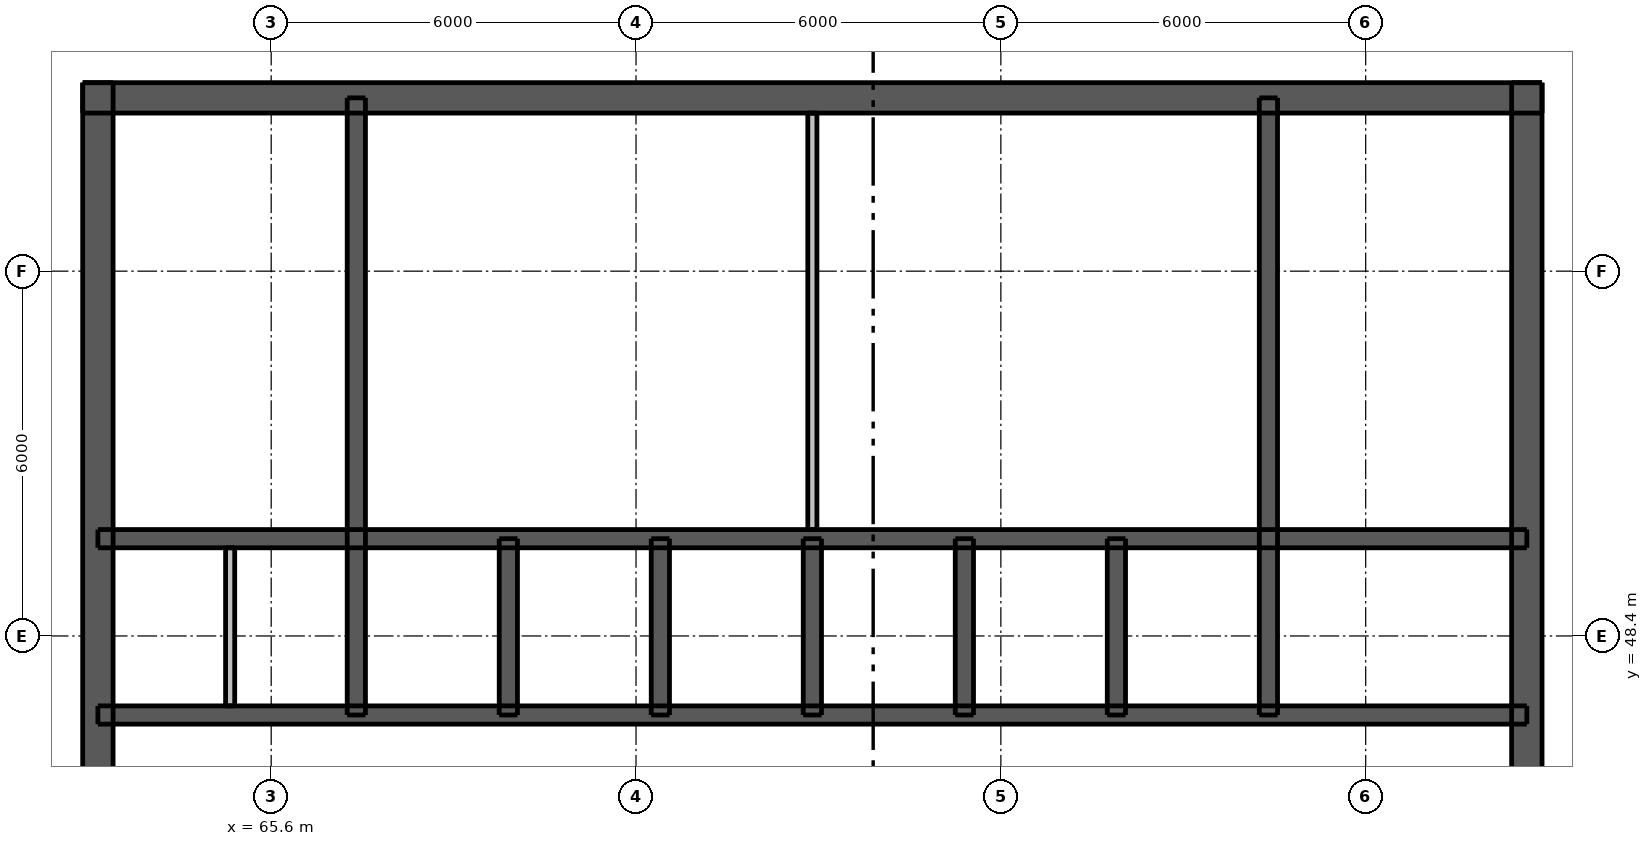
"""IFC4 building model, lengths in metres.
Left out: names, types, materials, properties, quantities, classifications, styles, units other than length and angle.
Written with IfcOpenShell. Run it as: python <this file> out.ifc"""

import sys

from ifc_helpers import new_model, si_unit, direction, frame, frame_2d, origin, place, context, subcontext, project, spatial, rectangle, extrude, element, fill, save


model = new_model("IFC4")
c1 = context("Model", 3, precision=1e-05, world=origin(), true_north=direction((0.0, 1.0)))
c2 = subcontext(c1, "Body", "Model", "MODEL_VIEW")
j1 = project(units=[si_unit("LENGTHUNIT", "METRE"), si_unit("PLANEANGLEUNIT", "RADIAN")], contexts=[c1])
p1 = place(None, origin())
s1 = spatial("IfcSite", under=j1, at=p1, CompositionType="ELEMENT")
p2 = place(p1, origin())
s2 = spatial("IfcBuilding", under=s1, at=p2, CompositionType="ELEMENT")
p3 = place(p2, frame((0.0, 0.0, 242.2)))
s3 = spatial("IfcBuildingStorey", under=s2, at=p3, CompositionType="ELEMENT", Elevation=242.2)
p4 = place(p3, frame((62.5, 57.25, 0.0), z_axis=(0.0, 0.0, 1.0), x_axis=(1.0, 0.0, 0.0)))
e1 = element("IfcWall", 1, at=p4, inside=s3, PredefinedType="SHEAR", context=c2, shape_type="SweptSolid", body=[
    extrude(rectangle(XDim=24.0, YDim=0.5, at=frame_2d((12.0, 0.0))), origin(), (0.0, 0.0, 1.0), 3.05),
])
p5 = place(p4, frame((21.025, 0.0, 0.0)))
e2 = element("IfcOpeningElement", 2, at=p5, cuts=e1, PredefinedType="OPENING", context=c2, shape_type="SweptSolid", body=[
    extrude(rectangle(XDim=1.1, YDim=2.1, at=frame_2d((0.55, 1.05))), frame((0.0, 0.26, 0.0), z_axis=(0.0, -1.0, 0.0), x_axis=(1.0, 0.0, 0.0)), (0.0, 0.0, 1.0), 0.52),
])
p6 = place(p4, frame((1.875, 0.0, 0.0)))
e3 = element("IfcOpeningElement", 3, at=p6, cuts=e1, PredefinedType="OPENING", context=c2, shape_type="SweptSolid", body=[
    extrude(rectangle(XDim=1.1, YDim=2.1, at=frame_2d((0.55, 1.05))), frame((0.0, 0.26, 0.0), z_axis=(0.0, -1.0, 0.0), x_axis=(1.0, 0.0, 0.0)), (0.0, 0.0, 1.0), 0.52),
])
p7 = place(p4, frame((7.875, 0.0, 0.0)))
e4 = element("IfcOpeningElement", 4, at=p7, cuts=e1, PredefinedType="OPENING", context=c2, shape_type="SweptSolid", body=[
    extrude(rectangle(XDim=0.9, YDim=2.1, at=frame_2d((0.45, 1.05))), frame((0.0, 0.26, 0.0), z_axis=(0.0, -1.0, 0.0), x_axis=(1.0, 0.0, 0.0)), (0.0, 0.0, 1.0), 0.52),
])
p8 = place(p4, frame((15.225, 0.0, 0.0)))
e5 = element("IfcOpeningElement", 5, at=p8, cuts=e1, PredefinedType="OPENING", context=c2, shape_type="SweptSolid", body=[
    extrude(rectangle(XDim=0.9, YDim=2.1, at=frame_2d((0.45, 1.05))), frame((0.0, 0.26, 0.0), z_axis=(0.0, -1.0, 0.0), x_axis=(1.0, 0.0, 0.0)), (0.0, 0.0, 1.0), 0.52),
])
p9 = place(p3, frame((62.75, 33.5, 0.0), z_axis=(0.0, 0.0, 1.0), x_axis=(0.0, 1.0, 0.0)))
e6 = element("IfcWall", 6, at=p9, inside=s3, PredefinedType="SHEAR", context=c2, shape_type="SweptSolid", body=[
    extrude(rectangle(XDim=24.0, YDim=0.5, at=frame_2d((12.0, 0.0))), origin(), (0.0, 0.0, 1.0), 3.05),
])
p10 = place(p9, frame((11.2, 0.0, 0.0)))
e7 = element("IfcOpeningElement", 7, at=p10, cuts=e6, PredefinedType="OPENING", context=c2, shape_type="SweptSolid", body=[
    extrude(rectangle(XDim=1.6, YDim=2.1, at=frame_2d((0.8, 1.05))), frame((0.0, 0.26, 0.0), z_axis=(0.0, -1.0, 0.0), x_axis=(1.0, 0.0, 0.0)), (0.0, 0.0, 1.0), 0.52),
])
p11 = place(p3, frame((86.25, 33.5, 0.0), z_axis=(0.0, 0.0, 1.0), x_axis=(0.0, 1.0, 0.0)))
e8 = element("IfcWall", 8, at=p11, inside=s3, PredefinedType="SHEAR", context=c2, shape_type="SweptSolid", body=[
    extrude(rectangle(XDim=24.0, YDim=0.5, at=frame_2d((12.0, 0.0))), origin(), (0.0, 0.0, 1.0), 3.05),
])
p12 = place(p11, frame((11.2, 0.0, 0.0)))
e9 = element("IfcOpeningElement", 9, at=p12, cuts=e8, PredefinedType="OPENING", context=c2, shape_type="SweptSolid", body=[
    extrude(rectangle(XDim=1.6, YDim=2.1, at=frame_2d((0.8, 1.05))), frame((0.0, 0.26, 0.0), z_axis=(0.0, -1.0, 0.0), x_axis=(1.0, 0.0, 0.0)), (0.0, 0.0, 1.0), 0.52),
])
p13 = place(p3, frame((62.75, 47.1, 0.0), z_axis=(0.0, 0.0, 1.0), x_axis=(1.0, 0.0, 0.0)))
e10 = element("IfcWall", 10, at=p13, inside=s3, PredefinedType="SHEAR", context=c2, shape_type="SweptSolid", body=[
    extrude(rectangle(XDim=23.5, YDim=0.3, at=frame_2d((11.75, 0.0))), origin(), (0.0, 0.0, 1.0), 3.05),
])
p14 = place(p13, frame((0.762, 0.0, 0.0)))
e11 = element("IfcOpeningElement", 11, at=p14, cuts=e10, PredefinedType="OPENING", context=c2, shape_type="SweptSolid", body=[
    extrude(rectangle(XDim=0.9, YDim=2.1, at=frame_2d((0.45, 1.05))), frame((0.0, 0.16, 0.0), z_axis=(0.0, -1.0, 0.0), x_axis=(1.0, 0.0, 0.0)), (0.0, 0.0, 1.0), 0.32),
])
p15 = place(p13, frame((2.688, 0.0, 0.0)))
e12 = element("IfcOpeningElement", 12, at=p15, cuts=e10, PredefinedType="OPENING", context=c2, shape_type="SweptSolid", body=[
    extrude(rectangle(XDim=0.9, YDim=2.1, at=frame_2d((0.45, 1.05))), frame((0.0, 0.16, 0.0), z_axis=(0.0, -1.0, 0.0), x_axis=(1.0, 0.0, 0.0)), (0.0, 0.0, 1.0), 0.32),
])
p16 = place(p13, frame((20.875, 0.0, 0.0)))
e13 = element("IfcOpeningElement", 13, at=p16, cuts=e10, PredefinedType="OPENING", context=c2, shape_type="SweptSolid", body=[
    extrude(rectangle(XDim=0.9, YDim=2.1, at=frame_2d((0.45, 1.05))), frame((0.0, 0.16, 0.0), z_axis=(0.0, -1.0, 0.0), x_axis=(1.0, 0.0, 0.0)), (0.0, 0.0, 1.0), 0.32),
])
p17 = place(p13, frame((4.95, 0.0, 0.0)))
e14 = element("IfcOpeningElement", 14, at=p17, cuts=e10, PredefinedType="OPENING", context=c2, shape_type="SweptSolid", body=[
    extrude(rectangle(XDim=1.1, YDim=2.1, at=frame_2d((0.55, 1.05))), frame((0.0, 0.16, 0.0), z_axis=(0.0, -1.0, 0.0), x_axis=(1.0, 0.0, 0.0)), (0.0, 0.0, 1.0), 0.32),
])
p18 = place(p13, frame((7.45, 0.0, 0.0)))
e15 = element("IfcOpeningElement", 15, at=p18, cuts=e10, PredefinedType="OPENING", context=c2, shape_type="SweptSolid", body=[
    extrude(rectangle(XDim=1.1, YDim=2.1, at=frame_2d((0.55, 1.05))), frame((0.0, 0.16, 0.0), z_axis=(0.0, -1.0, 0.0), x_axis=(1.0, 0.0, 0.0)), (0.0, 0.0, 1.0), 0.32),
])
p19 = place(p13, frame((9.95, 0.0, 0.0)))
e16 = element("IfcOpeningElement", 16, at=p19, cuts=e10, PredefinedType="OPENING", context=c2, shape_type="SweptSolid", body=[
    extrude(rectangle(XDim=1.1, YDim=2.1, at=frame_2d((0.55, 1.05))), frame((0.0, 0.16, 0.0), z_axis=(0.0, -1.0, 0.0), x_axis=(1.0, 0.0, 0.0)), (0.0, 0.0, 1.0), 0.32),
])
p20 = place(p13, frame((12.45, 0.0, 0.0)))
e17 = element("IfcOpeningElement", 17, at=p20, cuts=e10, PredefinedType="OPENING", context=c2, shape_type="SweptSolid", body=[
    extrude(rectangle(XDim=1.1, YDim=2.1, at=frame_2d((0.55, 1.05))), frame((0.0, 0.16, 0.0), z_axis=(0.0, -1.0, 0.0), x_axis=(1.0, 0.0, 0.0)), (0.0, 0.0, 1.0), 0.32),
])
p21 = place(p13, frame((14.95, 0.0, 0.0)))
e18 = element("IfcOpeningElement", 18, at=p21, cuts=e10, PredefinedType="OPENING", context=c2, shape_type="SweptSolid", body=[
    extrude(rectangle(XDim=1.1, YDim=2.1, at=frame_2d((0.55, 1.05))), frame((0.0, 0.16, 0.0), z_axis=(0.0, -1.0, 0.0), x_axis=(1.0, 0.0, 0.0)), (0.0, 0.0, 1.0), 0.32),
])
p22 = place(p13, frame((17.45, 0.0, 0.0)))
e19 = element("IfcOpeningElement", 19, at=p22, cuts=e10, PredefinedType="OPENING", context=c2, shape_type="SweptSolid", body=[
    extrude(rectangle(XDim=1.1, YDim=2.1, at=frame_2d((0.55, 1.05))), frame((0.0, 0.16, 0.0), z_axis=(0.0, -1.0, 0.0), x_axis=(1.0, 0.0, 0.0)), (0.0, 0.0, 1.0), 0.32),
])
p23 = place(p3, frame((62.75, 50.0, 0.0), z_axis=(0.0, 0.0, 1.0), x_axis=(1.0, 0.0, 0.0)))
e20 = element("IfcWall", 20, at=p23, inside=s3, PredefinedType="SHEAR", context=c2, shape_type="SweptSolid", body=[
    extrude(rectangle(XDim=23.5, YDim=0.3, at=frame_2d((11.75, 0.0))), origin(), (0.0, 0.0, 1.0), 3.05),
])
for number, where, z_axis, x_axis in (
    (21, (67.0, 47.1, 0.0), (0.0, 0.0, 1.0), (0.0, 1.0, 0.0)),
    (22, (82.0, 47.1, 0.0), (0.0, 0.0, 1.0), (0.0, 1.0, 0.0)),
):
    element("IfcWall", number, at=place(p3, frame(where, z_axis=z_axis, x_axis=x_axis)), inside=s3, PredefinedType="SHEAR", context=c2, shape_type="SweptSolid", body=[
        extrude(rectangle(XDim=10.15, YDim=0.3, at=frame_2d((5.075, 0.0))), origin(), (0.0, 0.0, 1.0), 3.05),
    ])
for number, where, z_axis, x_axis in (
    (23, (69.5, 47.1, 0.0), (0.0, 0.0, 1.0), (0.0, 1.0, 0.0)),
    (24, (72.0, 47.1, 0.0), (0.0, 0.0, 1.0), (0.0, 1.0, 0.0)),
    (25, (74.5, 47.1, 0.0), (0.0, 0.0, 1.0), (0.0, 1.0, 0.0)),
    (26, (77.0, 47.1, 0.0), (0.0, 0.0, 1.0), (0.0, 1.0, 0.0)),
    (27, (79.5, 47.1, 0.0), (0.0, 0.0, 1.0), (0.0, 1.0, 0.0)),
):
    element("IfcWall", number, at=place(p3, frame(where, z_axis=z_axis, x_axis=x_axis)), inside=s3, PredefinedType="SHEAR", context=c2, shape_type="SweptSolid", body=[
        extrude(rectangle(XDim=2.9, YDim=0.3, at=frame_2d((1.45, 0.0))), origin(), (0.0, 0.0, 1.0), 3.05),
    ])
p24 = place(p3, frame((64.925, 47.25, 0.0), z_axis=(0.0, 0.0, 1.0), x_axis=(0.0, 1.0, 0.0)))
e28 = element("IfcWall", 28, at=p24, inside=s3, PredefinedType="PLUMBINGWALL", context=c2, shape_type="SweptSolid", body=[
    extrude(rectangle(XDim=2.6, YDim=0.15, at=frame_2d((1.3, 0.0))), origin(), (0.0, 0.0, 1.0), 3.05),
])
p25 = place(p3, frame((74.5, 50.15, 0.0), z_axis=(0.0, 0.0, 1.0), x_axis=(0.0, 1.0, 0.0)))
e29 = element("IfcWall", 29, at=p25, inside=s3, PredefinedType="PLUMBINGWALL", context=c2, shape_type="SweptSolid", body=[
    extrude(rectangle(XDim=6.85, YDim=0.15, at=frame_2d((3.425, 0.0))), origin(), (0.0, 0.0, 1.0), 3.05),
])
p26 = place(p5, origin())
e30 = element("IfcDoor", 30, at=p26, inside=s3, OperationType="SINGLE_SWING_RIGHT", PredefinedType="DOOR", context=c2, shape_type="SweptSolid", body=[
    extrude(rectangle(XDim=1.1, YDim=2.1, at=frame_2d((0.55, 1.05))), frame((0.0, -0.188, 0.0), z_axis=(0.0, -1.0, 0.0), x_axis=(1.0, 0.0, 0.0)), (0.0, 0.0, 1.0), 0.05),
])
fill(e2, e30)
p27 = place(p6, origin())
e31 = element("IfcDoor", 31, at=p27, inside=s3, OperationType="SINGLE_SWING_LEFT", PredefinedType="DOOR", context=c2, shape_type="SweptSolid", body=[
    extrude(rectangle(XDim=1.1, YDim=2.1, at=frame_2d((0.55, 1.05))), frame((0.0, -0.188, 0.0), z_axis=(0.0, -1.0, 0.0), x_axis=(1.0, 0.0, 0.0)), (0.0, 0.0, 1.0), 0.05),
])
fill(e3, e31)
p28 = place(p10, origin())
e32 = element("IfcDoor", 32, at=p28, inside=s3, OperationType="DOUBLE_DOOR_SINGLE_SWING", PredefinedType="DOOR", context=c2, shape_type="SweptSolid", body=[
    extrude(rectangle(XDim=1.6, YDim=2.1, at=frame_2d((0.8, 1.05))), frame((0.0, -0.188, 0.0), z_axis=(0.0, -1.0, 0.0), x_axis=(1.0, 0.0, 0.0)), (0.0, 0.0, 1.0), 0.05),
])
fill(e7, e32)
p29 = place(p12, origin())
e33 = element("IfcDoor", 33, at=p29, inside=s3, OperationType="DOUBLE_DOOR_SINGLE_SWING", PredefinedType="DOOR", context=c2, shape_type="SweptSolid", body=[
    extrude(rectangle(XDim=1.6, YDim=2.1, at=frame_2d((0.8, 1.05))), frame((0.0, 0.237, 0.0), z_axis=(0.0, -1.0, 0.0), x_axis=(1.0, 0.0, 0.0)), (0.0, 0.0, 1.0), 0.05),
])
fill(e9, e33)
p30 = place(p14, origin())
e34 = element("IfcDoor", 34, at=p30, inside=s3, OperationType="SINGLE_SWING_LEFT", PredefinedType="DOOR", context=c2, shape_type="SweptSolid", body=[
    extrude(rectangle(XDim=0.9, YDim=2.1, at=frame_2d((0.45, 1.05))), frame((0.0, 0.138, 0.0), z_axis=(0.0, -1.0, 0.0), x_axis=(1.0, 0.0, 0.0)), (0.0, 0.0, 1.0), 0.05),
])
fill(e11, e34)
p31 = place(p15, origin())
e35 = element("IfcDoor", 35, at=p31, inside=s3, OperationType="SINGLE_SWING_RIGHT", PredefinedType="DOOR", context=c2, shape_type="SweptSolid", body=[
    extrude(rectangle(XDim=0.9, YDim=2.1, at=frame_2d((0.45, 1.05))), frame((0.0, 0.138, 0.0), z_axis=(0.0, -1.0, 0.0), x_axis=(1.0, 0.0, 0.0)), (0.0, 0.0, 1.0), 0.05),
])
fill(e12, e35)
p32 = place(p16, origin())
e36 = element("IfcDoor", 36, at=p32, inside=s3, OperationType="SINGLE_SWING_LEFT", PredefinedType="DOOR", context=c2, shape_type="SweptSolid", body=[
    extrude(rectangle(XDim=0.9, YDim=2.1, at=frame_2d((0.45, 1.05))), frame((0.0, 0.138, 0.0), z_axis=(0.0, -1.0, 0.0), x_axis=(1.0, 0.0, 0.0)), (0.0, 0.0, 1.0), 0.05),
])
fill(e13, e36)
p33 = place(p7, origin())
e37 = element("IfcDoor", 37, at=p33, inside=s3, OperationType="SINGLE_SWING_RIGHT", PredefinedType="DOOR", context=c2, shape_type="SweptSolid", body=[
    extrude(rectangle(XDim=0.9, YDim=2.1, at=frame_2d((0.45, 1.05))), frame((0.0, -0.188, 0.0), z_axis=(0.0, -1.0, 0.0), x_axis=(1.0, 0.0, 0.0)), (0.0, 0.0, 1.0), 0.05),
])
fill(e4, e37)
p34 = place(p8, origin())
e38 = element("IfcDoor", 38, at=p34, inside=s3, OperationType="SINGLE_SWING_RIGHT", PredefinedType="DOOR", context=c2, shape_type="SweptSolid", body=[
    extrude(rectangle(XDim=0.9, YDim=2.1, at=frame_2d((0.45, 1.05))), frame((0.0, -0.188, 0.0), z_axis=(0.0, -1.0, 0.0), x_axis=(1.0, 0.0, 0.0)), (0.0, 0.0, 1.0), 0.05),
])
fill(e5, e38)
p35 = place(p17, origin())
e39 = element("IfcDoor", 39, at=p35, inside=s3, OperationType="DOUBLE_DOOR_SLIDING", PredefinedType="DOOR", context=c2, shape_type="SweptSolid", body=[
    extrude(rectangle(XDim=1.1, YDim=2.1, at=frame_2d((0.55, 1.05))), frame((0.0, 0.025, 0.0), z_axis=(0.0, -1.0, 0.0), x_axis=(1.0, 0.0, 0.0)), (0.0, 0.0, 1.0), 0.05),
])
fill(e14, e39)
p36 = place(p18, origin())
e40 = element("IfcDoor", 40, at=p36, inside=s3, OperationType="DOUBLE_DOOR_SLIDING", PredefinedType="DOOR", context=c2, shape_type="SweptSolid", body=[
    extrude(rectangle(XDim=1.1, YDim=2.1, at=frame_2d((0.55, 1.05))), frame((0.0, 0.025, 0.0), z_axis=(0.0, -1.0, 0.0), x_axis=(1.0, 0.0, 0.0)), (0.0, 0.0, 1.0), 0.05),
])
fill(e15, e40)
p37 = place(p19, origin())
e41 = element("IfcDoor", 41, at=p37, inside=s3, OperationType="DOUBLE_DOOR_SLIDING", PredefinedType="DOOR", context=c2, shape_type="SweptSolid", body=[
    extrude(rectangle(XDim=1.1, YDim=2.1, at=frame_2d((0.55, 1.05))), frame((0.0, 0.025, 0.0), z_axis=(0.0, -1.0, 0.0), x_axis=(1.0, 0.0, 0.0)), (0.0, 0.0, 1.0), 0.05),
])
fill(e16, e41)
p38 = place(p20, origin())
e42 = element("IfcDoor", 42, at=p38, inside=s3, OperationType="DOUBLE_DOOR_SLIDING", PredefinedType="DOOR", context=c2, shape_type="SweptSolid", body=[
    extrude(rectangle(XDim=1.1, YDim=2.1, at=frame_2d((0.55, 1.05))), frame((0.0, 0.025, 0.0), z_axis=(0.0, -1.0, 0.0), x_axis=(1.0, 0.0, 0.0)), (0.0, 0.0, 1.0), 0.05),
])
fill(e17, e42)
p39 = place(p21, origin())
e43 = element("IfcDoor", 43, at=p39, inside=s3, OperationType="DOUBLE_DOOR_SLIDING", PredefinedType="DOOR", context=c2, shape_type="SweptSolid", body=[
    extrude(rectangle(XDim=1.1, YDim=2.1, at=frame_2d((0.55, 1.05))), frame((0.0, 0.025, 0.0), z_axis=(0.0, -1.0, 0.0), x_axis=(1.0, 0.0, 0.0)), (0.0, 0.0, 1.0), 0.05),
])
fill(e18, e43)
p40 = place(p22, origin())
e44 = element("IfcDoor", 44, at=p40, inside=s3, OperationType="DOUBLE_DOOR_SLIDING", PredefinedType="DOOR", context=c2, shape_type="SweptSolid", body=[
    extrude(rectangle(XDim=1.1, YDim=2.1, at=frame_2d((0.55, 1.05))), frame((0.0, 0.025, 0.0), z_axis=(0.0, -1.0, 0.0), x_axis=(1.0, 0.0, 0.0)), (0.0, 0.0, 1.0), 0.05),
])
fill(e19, e44)
save(model, sys.argv[1])
